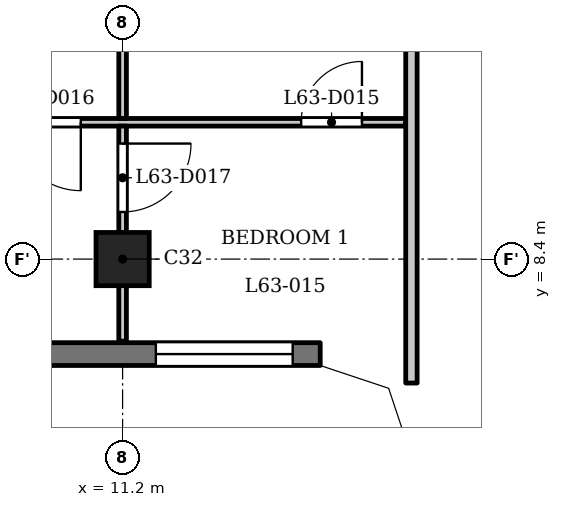
"""IFC4 building model, lengths in metres.
Left out: names, types, materials, properties, quantities, classifications, styles, units other than length and angle.
Written with IfcOpenShell. Run it as: python <this file> out.ifc"""

import sys

from ifc_helpers import new_model, si_unit, direction, frame, frame_2d, origin, origin_2d, place, context, subcontext, project, spatial, polyline, rectangle, outline, extrude, element, fill, save


model = new_model("IFC4")
c1 = context("Model", 3, precision=1e-05, world=origin(), true_north=direction((0.0, 1.0)))
c2 = subcontext(c1, "Body", "Model", "MODEL_VIEW")
j1 = project(units=[si_unit("LENGTHUNIT", "METRE"), si_unit("PLANEANGLEUNIT", "RADIAN")], contexts=[c1])
p1 = place(None, origin())
s1 = spatial("IfcSite", under=j1, at=p1, CompositionType="ELEMENT")
p2 = place(p1, origin())
s2 = spatial("IfcBuilding", under=s1, at=p2, CompositionType="ELEMENT")
p3 = place(p2, frame((0.0, 0.0, 245.2)))
s3 = spatial("IfcBuildingStorey", under=s2, at=p3, CompositionType="ELEMENT", Elevation=245.2)
p4 = place(p3, frame((11.2, 8.4, 0.0), z_axis=(0.0, 0.0, 1.0), x_axis=(1.0, 0.0, 0.0)))
e1 = element("IfcColumn", 1, at=p4, inside=s3, PredefinedType="COLUMN", context=c2, shape_type="SweptSolid", body=[
    extrude(rectangle(XDim=0.7, YDim=0.7, at=origin_2d()), origin(), (0.0, 0.0, 1.0), 3.5),
])
p5 = place(p3, frame((-13.8, 7.15, 0.0), z_axis=(0.0, 0.0, 1.0), x_axis=(1.0, 0.0, 0.0)))
e2 = element("IfcWall", 2, at=p5, inside=s3, PredefinedType="SOLIDWALL", context=c2, shape_type="SweptSolid", body=[
    extrude(rectangle(XDim=27.6, YDim=0.3, at=frame_2d((13.8, 0.0))), origin(), (0.0, 0.0, 1.0), 3.2),
])
p6 = place(p5, frame((0.363, 0.0, 0.9)))
e3 = element("IfcOpeningElement", 3, at=p6, cuts=e2, PredefinedType="OPENING", context=c2, shape_type="SweptSolid", body=[
    extrude(rectangle(XDim=1.8, YDim=1.25, at=frame_2d((0.9, 0.625))), frame((0.0, 0.16, 0.0), z_axis=(0.0, -1.0, 0.0), x_axis=(1.0, 0.0, 0.0)), (0.0, 0.0, 1.0), 0.32),
])
p7 = place(p5, frame((3.6, 0.0, 1.2)))
e4 = element("IfcOpeningElement", 4, at=p7, cuts=e2, PredefinedType="OPENING", context=c2, shape_type="SweptSolid", body=[
    extrude(rectangle(XDim=3.6, YDim=0.95, at=frame_2d((1.8, 0.475))), frame((0.0, 0.16, 0.0), z_axis=(0.0, -1.0, 0.0), x_axis=(1.0, 0.0, 0.0)), (0.0, 0.0, 1.0), 0.32),
])
p8 = place(p5, frame((9.2, 0.0, 1.2)))
e5 = element("IfcOpeningElement", 5, at=p8, cuts=e2, PredefinedType="OPENING", context=c2, shape_type="SweptSolid", body=[
    extrude(rectangle(XDim=3.6, YDim=0.95, at=frame_2d((1.8, 0.475))), frame((0.0, 0.16, 0.0), z_axis=(0.0, -1.0, 0.0), x_axis=(1.0, 0.0, 0.0)), (0.0, 0.0, 1.0), 0.32),
])
p9 = place(p5, frame((14.8, 0.0, 1.2)))
e6 = element("IfcOpeningElement", 6, at=p9, cuts=e2, PredefinedType="OPENING", context=c2, shape_type="SweptSolid", body=[
    extrude(rectangle(XDim=3.6, YDim=0.95, at=frame_2d((1.8, 0.475))), frame((0.0, 0.16, 0.0), z_axis=(0.0, -1.0, 0.0), x_axis=(1.0, 0.0, 0.0)), (0.0, 0.0, 1.0), 0.32),
])
p10 = place(p5, frame((20.4, 0.0, 1.2)))
e7 = element("IfcOpeningElement", 7, at=p10, cuts=e2, PredefinedType="OPENING", context=c2, shape_type="SweptSolid", body=[
    extrude(rectangle(XDim=3.6, YDim=0.95, at=frame_2d((1.8, 0.475))), frame((0.0, 0.16, 0.0), z_axis=(0.0, -1.0, 0.0), x_axis=(1.0, 0.0, 0.0)), (0.0, 0.0, 1.0), 0.32),
])
p11 = place(p5, frame((25.438, 0.0, 0.9)))
e8 = element("IfcOpeningElement", 8, at=p11, cuts=e2, PredefinedType="OPENING", context=c2, shape_type="SweptSolid", body=[
    extrude(rectangle(XDim=1.8, YDim=1.25, at=frame_2d((0.9, 0.625))), frame((0.0, 0.16, 0.0), z_axis=(0.0, -1.0, 0.0), x_axis=(1.0, 0.0, 0.0)), (0.0, 0.0, 1.0), 0.32),
])
p12 = place(p3, frame((-14.925, 10.2, 0.0), z_axis=(0.0, 0.0, 1.0), x_axis=(1.0, 0.0, 0.0)))
e9 = element("IfcWall", 9, at=p12, inside=s3, PredefinedType="PARTITIONING", context=c2, shape_type="SweptSolid", body=[
    extrude(rectangle(XDim=29.85, YDim=0.1, at=frame_2d((14.925, 0.0))), origin(), (0.0, 0.0, 1.0), 3.2),
])
p13 = place(p12, frame((13.475, 0.0, 0.0)))
e10 = element("IfcOpeningElement", 10, at=p13, cuts=e9, PredefinedType="OPENING", context=c2, shape_type="SweptSolid", body=[
    extrude(rectangle(XDim=0.9, YDim=2.1, at=frame_2d((0.45, 1.05))), frame((0.0, 0.06, 0.0), z_axis=(0.0, -1.0, 0.0), x_axis=(1.0, 0.0, 0.0)), (0.0, 0.0, 1.0), 0.12),
])
p14 = place(p12, frame((4.375, 0.0, 0.0)))
e11 = element("IfcOpeningElement", 11, at=p14, cuts=e9, PredefinedType="OPENING", context=c2, shape_type="SweptSolid", body=[
    extrude(rectangle(XDim=0.9, YDim=2.1, at=frame_2d((0.45, 1.05))), frame((0.0, 0.06, 0.0), z_axis=(0.0, -1.0, 0.0), x_axis=(1.0, 0.0, 0.0)), (0.0, 0.0, 1.0), 0.12),
])
p15 = place(p12, frame((15.475, 0.0, 0.0)))
e12 = element("IfcOpeningElement", 12, at=p15, cuts=e9, PredefinedType="OPENING", context=c2, shape_type="SweptSolid", body=[
    extrude(rectangle(XDim=0.8, YDim=2.1, at=frame_2d((0.4, 1.05))), frame((0.0, 0.06, 0.0), z_axis=(0.0, -1.0, 0.0), x_axis=(1.0, 0.0, 0.0)), (0.0, 0.0, 1.0), 0.12),
])
p16 = place(p12, frame((18.825, 0.0, 0.0)))
e13 = element("IfcOpeningElement", 13, at=p16, cuts=e9, PredefinedType="OPENING", context=c2, shape_type="SweptSolid", body=[
    extrude(rectangle(XDim=0.9, YDim=2.1, at=frame_2d((0.45, 1.05))), frame((0.0, 0.06, 0.0), z_axis=(0.0, -1.0, 0.0), x_axis=(1.0, 0.0, 0.0)), (0.0, 0.0, 1.0), 0.12),
])
p17 = place(p12, frame((28.474, 0.0, 0.0)))
e14 = element("IfcOpeningElement", 14, at=p17, cuts=e9, PredefinedType="OPENING", context=c2, shape_type="SweptSolid", body=[
    extrude(rectangle(XDim=0.8, YDim=2.1, at=frame_2d((0.4, 1.05))), frame((0.0, 0.06, 0.0), z_axis=(0.0, -1.0, 0.0), x_axis=(1.0, 0.0, 0.0)), (0.0, 0.0, 1.0), 0.12),
])
p18 = place(p12, frame((24.675, 0.0, 0.0)))
e15 = element("IfcOpeningElement", 15, at=p18, cuts=e9, PredefinedType="OPENING", context=c2, shape_type="SweptSolid", body=[
    extrude(rectangle(XDim=0.9, YDim=2.1, at=frame_2d((0.45, 1.05))), frame((0.0, 0.06, 0.0), z_axis=(0.0, -1.0, 0.0), x_axis=(1.0, 0.0, 0.0)), (0.0, 0.0, 1.0), 0.12),
])
p19 = place(p3, frame((11.2, 7.32, 0.0), z_axis=(0.0, 0.0, 1.0), x_axis=(0.0, 1.0, 0.0)))
e16 = element("IfcWall", 16, at=p19, inside=s3, PredefinedType="PARTITIONING", context=c2, shape_type="SweptSolid", body=[
    extrude(rectangle(XDim=2.83, YDim=0.1, at=frame_2d((1.415, 0.0))), origin(), (0.0, 0.0, 1.0), 3.2),
])
p20 = place(p19, frame((1.7, 0.0, 0.0)))
e17 = element("IfcOpeningElement", 17, at=p20, cuts=e16, PredefinedType="OPENING", context=c2, shape_type="SweptSolid", body=[
    extrude(rectangle(XDim=0.9, YDim=2.1, at=frame_2d((0.45, 1.05))), frame((0.0, 0.06, 0.0), z_axis=(0.0, -1.0, 0.0), x_axis=(1.0, 0.0, 0.0)), (0.0, 0.0, 1.0), 0.12),
])
p21 = place(p3, frame((11.2, 10.25, 0.0), z_axis=(0.0, 0.0, 1.0), x_axis=(0.0, 1.0, 0.0)))
e18 = element("IfcWall", 18, at=p21, inside=s3, PredefinedType="PARTITIONING", context=c2, shape_type="SweptSolid", body=[
    extrude(rectangle(XDim=3.475, YDim=0.1, at=frame_2d((1.738, 0.0))), origin(), (0.0, 0.0, 1.0), 3.2),
])
p22 = place(p3, frame((15.0, 6.769, 0.0), z_axis=(0.0, 0.0, 1.0), x_axis=(0.0, 1.0, 0.0)))
e19 = element("IfcWall", 19, at=p22, inside=s3, PredefinedType="PARTITIONING", context=c2, shape_type="SweptSolid", body=[
    extrude(rectangle(XDim=6.956, YDim=0.15, at=frame_2d((3.478, 0.0))), origin(), (0.0, 0.0, 1.0), 3.2),
])
p23 = place(p3, origin())
e20 = element("IfcWall", 20, at=p23, inside=s3, PredefinedType="SOLIDWALL", context=c2, shape_type="SweptSolid", body=[
    extrude(outline(polyline([(14.937, 6.937), (13.849, 7.3), (13.8, 7.3), (13.8, 7.0), (14.7, 6.7), (15.0, 5.8), (15.3, 5.8), (15.3, 5.849), (14.937, 6.937)])), origin(), (0.0, 0.0, 1.0), 3.2),
])
p24 = place(p17, origin())
e21 = element("IfcDoor", 21, at=p24, inside=s3, OperationType="SINGLE_SWING_LEFT", PredefinedType="DOOR", context=c2, shape_type="SweptSolid", body=[
    extrude(rectangle(XDim=0.8, YDim=2.1, at=frame_2d((0.4, 1.05))), frame((0.0, 0.025, 0.0), z_axis=(0.0, -1.0, 0.0), x_axis=(1.0, 0.0, 0.0)), (0.0, 0.0, 1.0), 0.05),
])
fill(e14, e21)
p25 = place(p18, origin())
e22 = element("IfcDoor", 22, at=p25, inside=s3, OperationType="SINGLE_SWING_RIGHT", PredefinedType="DOOR", context=c2, shape_type="SweptSolid", body=[
    extrude(rectangle(XDim=0.9, YDim=2.1, at=frame_2d((0.45, 1.05))), frame((0.0, 0.025, 0.0), z_axis=(0.0, -1.0, 0.0), x_axis=(1.0, 0.0, 0.0)), (0.0, 0.0, 1.0), 0.05),
])
fill(e15, e22)
p26 = place(p20, origin())
e23 = element("IfcDoor", 23, at=p26, inside=s3, OperationType="SINGLE_SWING_RIGHT", PredefinedType="DOOR", context=c2, shape_type="SweptSolid", body=[
    extrude(rectangle(XDim=0.9, YDim=2.1, at=frame_2d((0.45, 1.05))), frame((0.0, 0.025, 0.0), z_axis=(0.0, -1.0, 0.0), x_axis=(1.0, 0.0, 0.0)), (0.0, 0.0, 1.0), 0.05),
])
fill(e17, e23)
p27 = place(p11, origin())
e24 = element("IfcWindow", 24, at=p27, inside=s3, PartitioningType="SINGLE_PANEL", PredefinedType="WINDOW", context=c2, shape_type="SweptSolid", body=[
    extrude(rectangle(XDim=1.8, YDim=1.25, at=frame_2d((0.9, 0.625))), frame((0.0, 0.03, 0.0), z_axis=(0.0, -1.0, 0.0), x_axis=(1.0, 0.0, 0.0)), (0.0, 0.0, 1.0), 0.06),
])
fill(e8, e24)
save(model, sys.argv[1])
